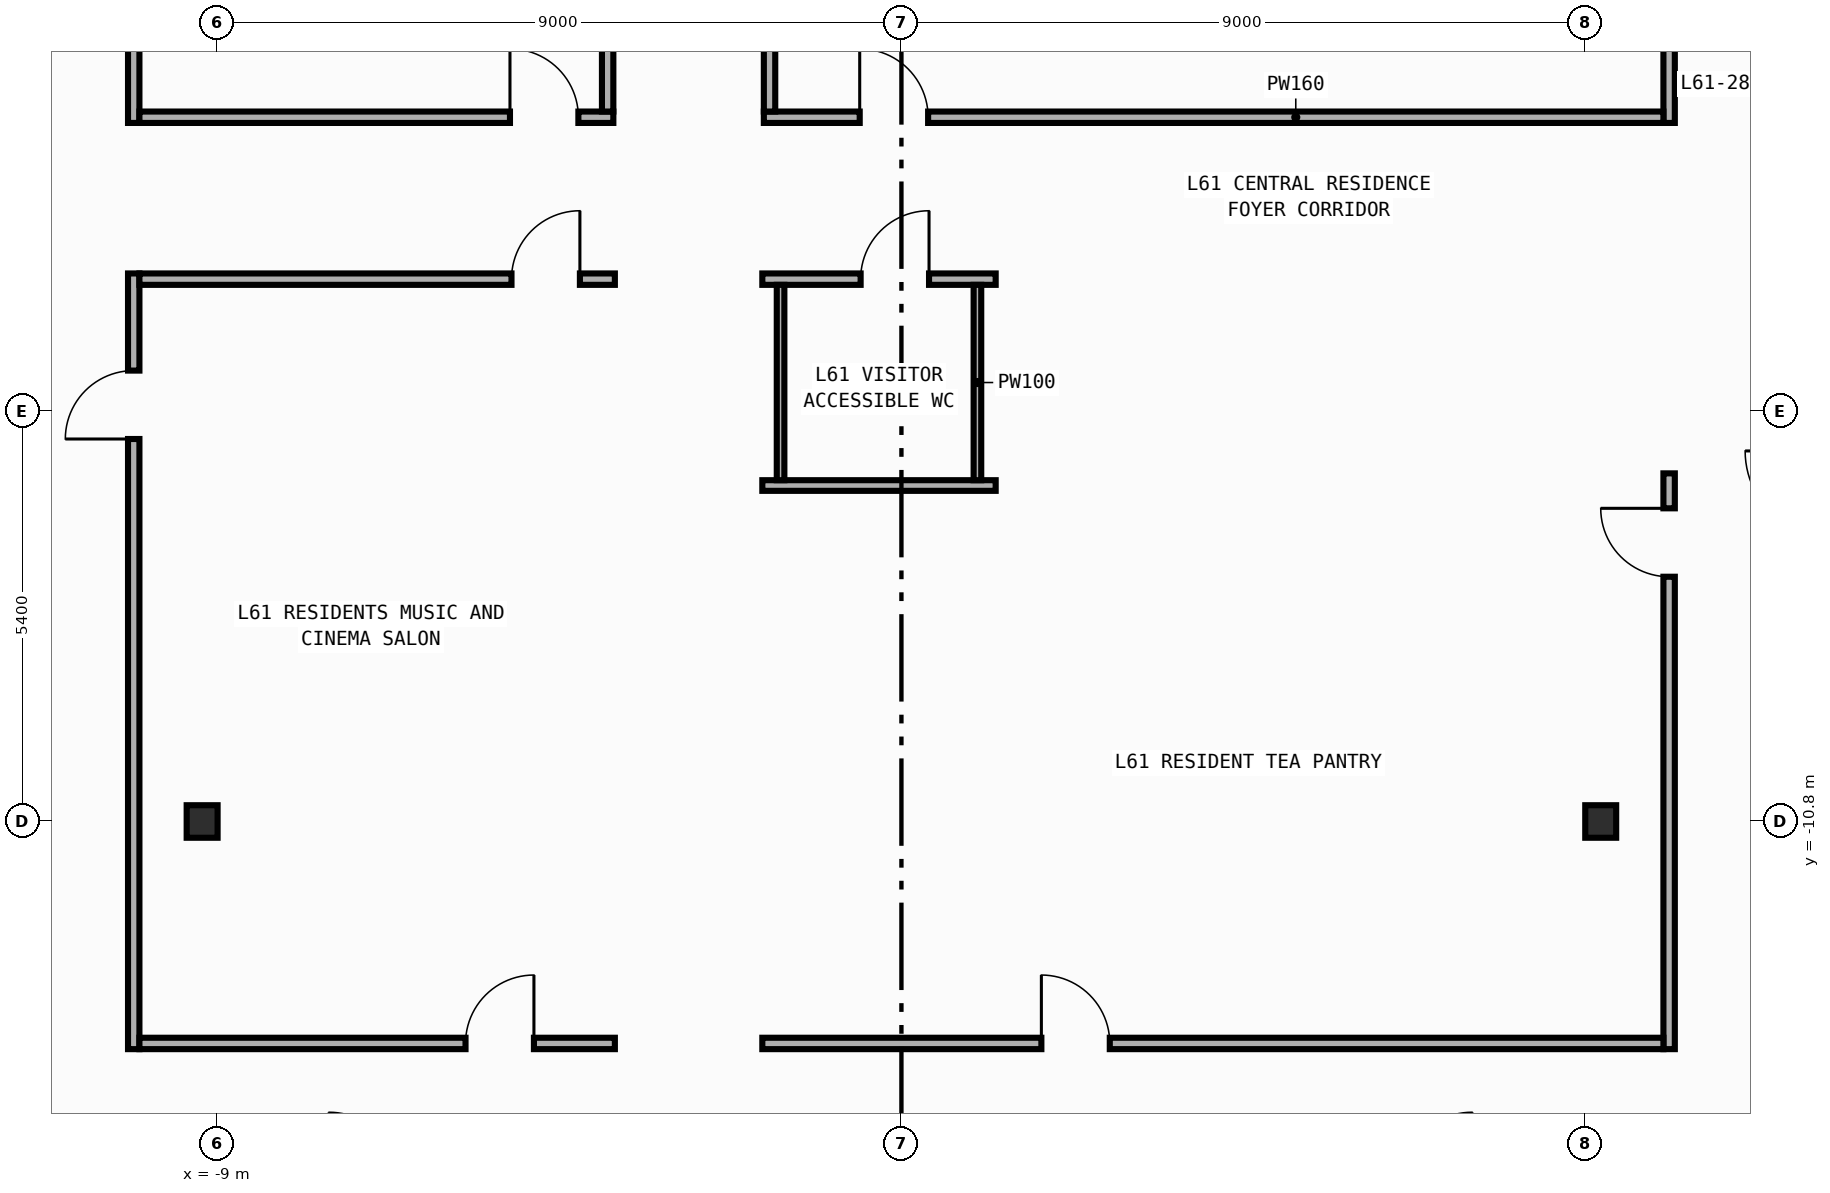
"""IFC4 building model, lengths in metres.
Left out: names, types, materials, properties, quantities, classifications, styles, units other than length and angle.
Written with IfcOpenShell. Run it as: python <this file> out.ifc"""

import sys

from ifc_helpers import new_model, si_unit, direction, frame, frame_2d, origin, origin_2d, place, context, subcontext, project, spatial, rectangle, i_section, extrude, element, fill, save


model = new_model("IFC4")
c1 = context("Model", 3, precision=1e-05, world=origin(), true_north=direction((0.0, 1.0)))
c2 = subcontext(c1, "Body", "Model", "MODEL_VIEW")
j1 = project(units=[si_unit("LENGTHUNIT", "METRE"), si_unit("PLANEANGLEUNIT", "RADIAN")], contexts=[c1])
p1 = place(None, origin())
s1 = spatial("IfcSite", under=j1, at=p1, CompositionType="ELEMENT")
p2 = place(p1, origin())
s2 = spatial("IfcBuilding", under=s1, at=p2, CompositionType="ELEMENT")
p3 = place(p2, frame((0.0, 0.0, 258.4)))
s3 = spatial("IfcBuildingStorey", under=s2, at=p3, CompositionType="ELEMENT", Elevation=258.4)
for number, where, z_axis, x_axis in (
    (1, (-9.2, -10.8, 0.0), (0.0, 0.0, 1.0), (1.0, 0.0, 0.0)),
    (2, (9.2, -10.8, 0.0), (0.0, 0.0, 1.0), (1.0, 0.0, 0.0)),
):
    element("IfcColumn", number, at=place(p3, frame(where, z_axis=z_axis, x_axis=x_axis)), inside=s3, PredefinedType="COLUMN", context=c2, shape_type="SweptSolid", body=[
        extrude(i_section(OverallWidth=0.407, OverallDepth=0.428, WebThickness=0.02, FlangeThickness=0.035, FilletRadius=0.022, at=origin_2d()), origin(), (0.0, 0.0, 1.0), 3.6),
    ])
p4 = place(p3, frame((-10.1, -1.61, 0.0), z_axis=(0.0, 0.0, 1.0), x_axis=(0.0, 1.0, 0.0)))
e3 = element("IfcWall", 3, at=p4, inside=s3, PredefinedType="PARTITIONING", context=c2, shape_type="SweptSolid", body=[
    extrude(rectangle(XDim=15.405, YDim=0.15, at=frame_2d((7.703, 0.0))), origin(), (0.0, 0.0, 1.0), 3.34),
])
p5 = place(p4, frame((6.543, 0.0, 0.0)))
e4 = element("IfcOpeningElement", 4, at=p5, cuts=e3, PredefinedType="OPENING", context=c2, shape_type="SweptSolid", body=[
    extrude(rectangle(XDim=0.9, YDim=2.15, at=frame_2d((0.45, 1.075))), frame((0.0, 0.085, 0.0), z_axis=(0.0, -1.0, 0.0), x_axis=(1.0, 0.0, 0.0)), (0.0, 0.0, 1.0), 0.17),
])
p6 = place(p3, frame((-10.1, -13.795, 0.0), z_axis=(0.0, 0.0, 1.0), x_axis=(0.0, 1.0, 0.0)))
e5 = element("IfcWall", 5, at=p6, inside=s3, PredefinedType="PARTITIONING", context=c2, shape_type="SweptSolid", body=[
    extrude(rectangle(XDim=10.205, YDim=0.15, at=frame_2d((5.103, 0.0))), origin(), (0.0, 0.0, 1.0), 3.34),
])
p7 = place(p6, frame((8.027, 0.0, 0.0)))
e6 = element("IfcOpeningElement", 6, at=p7, cuts=e5, PredefinedType="OPENING", context=c2, shape_type="SweptSolid", body=[
    extrude(rectangle(XDim=0.9, YDim=2.15, at=frame_2d((0.45, 1.075))), frame((0.0, 0.085, 0.0), z_axis=(0.0, -1.0, 0.0), x_axis=(1.0, 0.0, 0.0)), (0.0, 0.0, 1.0), 0.17),
])
p8 = place(p3, frame((10.1, -1.61, 0.0), z_axis=(0.0, 0.0, 1.0), x_axis=(0.0, 1.0, 0.0)))
e7 = element("IfcWall", 7, at=p8, inside=s3, PredefinedType="PARTITIONING", context=c2, shape_type="SweptSolid", body=[
    extrude(rectangle(XDim=15.405, YDim=0.15, at=frame_2d((7.703, 0.0))), origin(), (0.0, 0.0, 1.0), 3.34),
])
p9 = place(p8, frame((6.543, 0.0, 0.0)))
e8 = element("IfcOpeningElement", 8, at=p9, cuts=e7, PredefinedType="OPENING", context=c2, shape_type="SweptSolid", body=[
    extrude(rectangle(XDim=0.9, YDim=2.15, at=frame_2d((0.45, 1.075))), frame((0.0, 0.085, 0.0), z_axis=(0.0, -1.0, 0.0), x_axis=(1.0, 0.0, 0.0)), (0.0, 0.0, 1.0), 0.17),
])
p10 = place(p3, frame((10.1, -13.795, 0.0), z_axis=(0.0, 0.0, 1.0), x_axis=(0.0, 1.0, 0.0)))
e9 = element("IfcWall", 9, at=p10, inside=s3, PredefinedType="PARTITIONING", context=c2, shape_type="SweptSolid", body=[
    extrude(rectangle(XDim=7.575, YDim=0.15, at=frame_2d((3.788, 0.0))), origin(), (0.0, 0.0, 1.0), 3.34),
])
p11 = place(p10, frame((6.215, 0.0, 0.0)))
e10 = element("IfcOpeningElement", 10, at=p11, cuts=e9, PredefinedType="OPENING", context=c2, shape_type="SweptSolid", body=[
    extrude(rectangle(XDim=0.9, YDim=2.15, at=frame_2d((0.45, 1.075))), frame((0.0, 0.085, 0.0), z_axis=(0.0, -1.0, 0.0), x_axis=(1.0, 0.0, 0.0)), (0.0, 0.0, 1.0), 0.17),
])
p12 = place(p3, frame((-10.025, -1.535, 0.0), z_axis=(0.0, 0.0, 1.0), x_axis=(1.0, 0.0, 0.0)))
e11 = element("IfcWall", 11, at=p12, inside=s3, PredefinedType="PARTITIONING", context=c2, shape_type="SweptSolid", body=[
    extrude(rectangle(XDim=6.235, YDim=0.15, at=frame_2d((3.117, 0.0))), origin(), (0.0, 0.0, 1.0), 3.34),
])
p13 = place(p12, frame((4.875, 0.0, 0.0)))
e12 = element("IfcOpeningElement", 12, at=p13, cuts=e11, PredefinedType="OPENING", context=c2, shape_type="SweptSolid", body=[
    extrude(rectangle(XDim=0.9, YDim=2.15, at=frame_2d((0.45, 1.075))), frame((0.0, 0.085, 0.0), z_axis=(0.0, -1.0, 0.0), x_axis=(1.0, 0.0, 0.0)), (0.0, 0.0, 1.0), 0.17),
])
p14 = place(p3, frame((-10.025, -3.665, 0.0), z_axis=(0.0, 0.0, 1.0), x_axis=(1.0, 0.0, 0.0)))
e13 = element("IfcWall", 13, at=p14, inside=s3, PredefinedType="PARTITIONING", context=c2, shape_type="SweptSolid", body=[
    extrude(rectangle(XDim=6.255, YDim=0.15, at=frame_2d((3.127, 0.0))), origin(), (0.0, 0.0, 1.0), 3.34),
])
p15 = place(p14, frame((4.895, 0.0, 0.0)))
e14 = element("IfcOpeningElement", 14, at=p15, cuts=e13, PredefinedType="OPENING", context=c2, shape_type="SweptSolid", body=[
    extrude(rectangle(XDim=0.9, YDim=2.15, at=frame_2d((0.45, 1.075))), frame((0.0, 0.085, 0.0), z_axis=(0.0, -1.0, 0.0), x_axis=(1.0, 0.0, 0.0)), (0.0, 0.0, 1.0), 0.17),
])
p16 = place(p3, frame((-1.81, -1.535, 0.0), z_axis=(0.0, 0.0, 1.0), x_axis=(1.0, 0.0, 0.0)))
e15 = element("IfcWall", 15, at=p16, inside=s3, PredefinedType="PARTITIONING", context=c2, shape_type="SweptSolid", body=[
    extrude(rectangle(XDim=11.835, YDim=0.15, at=frame_2d((5.917, 0.0))), origin(), (0.0, 0.0, 1.0), 3.34),
])
p17 = place(p16, frame((1.261, 0.0, 0.0)))
e16 = element("IfcOpeningElement", 16, at=p17, cuts=e15, PredefinedType="OPENING", context=c2, shape_type="SweptSolid", body=[
    extrude(rectangle(XDim=0.9, YDim=2.15, at=frame_2d((0.45, 1.075))), frame((0.0, 0.085, 0.0), z_axis=(0.0, -1.0, 0.0), x_axis=(1.0, 0.0, 0.0)), (0.0, 0.0, 1.0), 0.17),
])
p18 = place(p3, frame((-1.83, -3.665, 0.0), z_axis=(0.0, 0.0, 1.0), x_axis=(1.0, 0.0, 0.0)))
e17 = element("IfcWall", 17, at=p18, inside=s3, PredefinedType="PARTITIONING", context=c2, shape_type="SweptSolid", body=[
    extrude(rectangle(XDim=3.07, YDim=0.15, at=frame_2d((1.535, 0.0))), origin(), (0.0, 0.0, 1.0), 3.34),
])
p19 = place(p18, frame((1.293, 0.0, 0.0)))
e18 = element("IfcOpeningElement", 18, at=p19, cuts=e17, PredefinedType="OPENING", context=c2, shape_type="SweptSolid", body=[
    extrude(rectangle(XDim=0.9, YDim=2.15, at=frame_2d((0.45, 1.075))), frame((0.0, 0.085, 0.0), z_axis=(0.0, -1.0, 0.0), x_axis=(1.0, 0.0, 0.0)), (0.0, 0.0, 1.0), 0.17),
])
p20 = place(p3, frame((-3.865, -1.46, 0.0), z_axis=(0.0, 0.0, 1.0), x_axis=(0.0, 1.0, 0.0)))
e19 = element("IfcWall", 19, at=p20, inside=s3, PredefinedType="PARTITIONING", context=c2, shape_type="SweptSolid", body=[
    extrude(rectangle(XDim=15.255, YDim=0.15, at=frame_2d((7.627, 0.0))), origin(), (0.0, 0.0, 1.0), 3.34),
])
p21 = place(p20, frame((6.476, 0.0, 0.0)))
e20 = element("IfcOpeningElement", 20, at=p21, cuts=e19, PredefinedType="OPENING", context=c2, shape_type="SweptSolid", body=[
    extrude(rectangle(XDim=0.9, YDim=2.15, at=frame_2d((0.45, 1.075))), frame((0.0, 0.085, 0.0), z_axis=(0.0, -1.0, 0.0), x_axis=(1.0, 0.0, 0.0)), (0.0, 0.0, 1.0), 0.17),
])
p22 = place(p3, frame((-1.735, -1.46, 0.0), z_axis=(0.0, 0.0, 1.0), x_axis=(0.0, 1.0, 0.0)))
e21 = element("IfcWall", 21, at=p22, inside=s3, PredefinedType="PARTITIONING", context=c2, shape_type="SweptSolid", body=[
    extrude(rectangle(XDim=15.255, YDim=0.15, at=frame_2d((7.627, 0.0))), origin(), (0.0, 0.0, 1.0), 3.34),
])
p23 = place(p22, frame((6.476, 0.0, 0.0)))
e22 = element("IfcOpeningElement", 22, at=p23, cuts=e21, PredefinedType="OPENING", context=c2, shape_type="SweptSolid", body=[
    extrude(rectangle(XDim=0.9, YDim=2.15, at=frame_2d((0.45, 1.075))), frame((0.0, 0.085, 0.0), z_axis=(0.0, -1.0, 0.0), x_axis=(1.0, 0.0, 0.0)), (0.0, 0.0, 1.0), 0.17),
])
p24 = place(p3, frame((-10.025, -13.72, 0.0), z_axis=(0.0, 0.0, 1.0), x_axis=(1.0, 0.0, 0.0)))
e23 = element("IfcWall", 23, at=p24, inside=s3, PredefinedType="PARTITIONING", context=c2, shape_type="SweptSolid", body=[
    extrude(rectangle(XDim=6.255, YDim=0.15, at=frame_2d((3.127, 0.0))), origin(), (0.0, 0.0, 1.0), 3.34),
])
p25 = place(p24, frame((4.29, 0.0, 0.0)))
e24 = element("IfcOpeningElement", 24, at=p25, cuts=e23, PredefinedType="OPENING", context=c2, shape_type="SweptSolid", body=[
    extrude(rectangle(XDim=0.9, YDim=2.15, at=frame_2d((0.45, 1.075))), frame((0.0, 0.085, 0.0), z_axis=(0.0, -1.0, 0.0), x_axis=(1.0, 0.0, 0.0)), (0.0, 0.0, 1.0), 0.17),
])
p26 = place(p3, frame((-1.83, -13.72, 0.0), z_axis=(0.0, 0.0, 1.0), x_axis=(1.0, 0.0, 0.0)))
e25 = element("IfcWall", 25, at=p26, inside=s3, PredefinedType="PARTITIONING", context=c2, shape_type="SweptSolid", body=[
    extrude(rectangle(XDim=11.855, YDim=0.15, at=frame_2d((5.927, 0.0))), origin(), (0.0, 0.0, 1.0), 3.34),
])
p27 = place(p26, frame((3.671, 0.0, 0.0)))
e26 = element("IfcOpeningElement", 26, at=p27, cuts=e25, PredefinedType="OPENING", context=c2, shape_type="SweptSolid", body=[
    extrude(rectangle(XDim=0.9, YDim=2.15, at=frame_2d((0.45, 1.075))), frame((0.0, 0.085, 0.0), z_axis=(0.0, -1.0, 0.0), x_axis=(1.0, 0.0, 0.0)), (0.0, 0.0, 1.0), 0.17),
])
p28 = place(p3, frame((-1.83, -6.38, 0.0), z_axis=(0.0, 0.0, 1.0), x_axis=(1.0, 0.0, 0.0)))
e27 = element("IfcWall", 27, at=p28, inside=s3, PredefinedType="PARTITIONING", context=c2, shape_type="SweptSolid", body=[
    extrude(rectangle(XDim=3.07, YDim=0.14, at=frame_2d((1.535, 0.0))), origin(), (0.0, 0.0, 1.0), 3.34),
])
for number, where, z_axis, x_axis in (
    (28, (1.0, -3.74, 0.0), (0.0, 0.0, 1.0), (0.0, -1.0, 0.0)),
    (29, (-1.59, -6.31, 0.0), (0.0, 0.0, 1.0), (0.0, 1.0, 0.0)),
):
    element("IfcWall", number, at=place(p3, frame(where, z_axis=z_axis, x_axis=x_axis)), inside=s3, PredefinedType="PARTITIONING", context=c2, shape_type="SweptSolid", body=[
        extrude(rectangle(XDim=2.57, YDim=0.1, at=frame_2d((1.285, 0.0))), origin(), (0.0, 0.0, 1.0), 3.34),
    ])
p29 = place(p7, origin())
e30 = element("IfcDoor", 30, at=p29, inside=s3, OperationType="SINGLE_SWING_LEFT", PredefinedType="DOOR", context=c2, shape_type="SweptSolid", body=[
    extrude(rectangle(XDim=0.9, YDim=2.15, at=frame_2d((0.45, 1.075))), frame((0.0, 0.025, 0.0), z_axis=(0.0, -1.0, 0.0), x_axis=(1.0, 0.0, 0.0)), (0.0, 0.0, 1.0), 0.05),
])
fill(e6, e30)
p30 = place(p11, origin())
e31 = element("IfcDoor", 31, at=p30, inside=s3, OperationType="SINGLE_SWING_RIGHT", PredefinedType="DOOR", context=c2, shape_type="SweptSolid", body=[
    extrude(rectangle(XDim=0.9, YDim=2.15, at=frame_2d((0.45, 1.075))), frame((0.0, 0.025, 0.0), z_axis=(0.0, -1.0, 0.0), x_axis=(1.0, 0.0, 0.0)), (0.0, 0.0, 1.0), 0.05),
])
fill(e10, e31)
p31 = place(p13, origin())
e32 = element("IfcDoor", 32, at=p31, inside=s3, OperationType="SINGLE_SWING_LEFT", PredefinedType="DOOR", context=c2, shape_type="SweptSolid", body=[
    extrude(rectangle(XDim=0.9, YDim=2.15, at=frame_2d((0.45, 1.075))), frame((0.0, 0.025, 0.0), z_axis=(0.0, -1.0, 0.0), x_axis=(1.0, 0.0, 0.0)), (0.0, 0.0, 1.0), 0.05),
])
fill(e12, e32)
p32 = place(p15, origin())
e33 = element("IfcDoor", 33, at=p32, inside=s3, OperationType="SINGLE_SWING_RIGHT", PredefinedType="DOOR", context=c2, shape_type="SweptSolid", body=[
    extrude(rectangle(XDim=0.9, YDim=2.15, at=frame_2d((0.45, 1.075))), frame((0.0, 0.025, 0.0), z_axis=(0.0, -1.0, 0.0), x_axis=(1.0, 0.0, 0.0)), (0.0, 0.0, 1.0), 0.05),
])
fill(e14, e33)
p33 = place(p17, origin())
e34 = element("IfcDoor", 34, at=p33, inside=s3, OperationType="SINGLE_SWING_LEFT", PredefinedType="DOOR", context=c2, shape_type="SweptSolid", body=[
    extrude(rectangle(XDim=0.9, YDim=2.15, at=frame_2d((0.45, 1.075))), frame((0.0, 0.025, 0.0), z_axis=(0.0, -1.0, 0.0), x_axis=(1.0, 0.0, 0.0)), (0.0, 0.0, 1.0), 0.05),
])
fill(e16, e34)
p34 = place(p19, origin())
e35 = element("IfcDoor", 35, at=p34, inside=s3, OperationType="SINGLE_SWING_RIGHT", PredefinedType="DOOR", context=c2, shape_type="SweptSolid", body=[
    extrude(rectangle(XDim=0.9, YDim=2.15, at=frame_2d((0.45, 1.075))), frame((0.0, 0.025, 0.0), z_axis=(0.0, -1.0, 0.0), x_axis=(1.0, 0.0, 0.0)), (0.0, 0.0, 1.0), 0.05),
])
fill(e18, e35)
p35 = place(p25, origin())
e36 = element("IfcDoor", 36, at=p35, inside=s3, OperationType="SINGLE_SWING_RIGHT", PredefinedType="DOOR", context=c2, shape_type="SweptSolid", body=[
    extrude(rectangle(XDim=0.9, YDim=2.15, at=frame_2d((0.45, 1.075))), frame((0.0, 0.025, 0.0), z_axis=(0.0, -1.0, 0.0), x_axis=(1.0, 0.0, 0.0)), (0.0, 0.0, 1.0), 0.05),
])
fill(e24, e36)
p36 = place(p27, origin())
e37 = element("IfcDoor", 37, at=p36, inside=s3, OperationType="SINGLE_SWING_LEFT", PredefinedType="DOOR", context=c2, shape_type="SweptSolid", body=[
    extrude(rectangle(XDim=0.9, YDim=2.15, at=frame_2d((0.45, 1.075))), frame((0.0, 0.025, 0.0), z_axis=(0.0, -1.0, 0.0), x_axis=(1.0, 0.0, 0.0)), (0.0, 0.0, 1.0), 0.05),
])
fill(e26, e37)
save(model, sys.argv[1])
